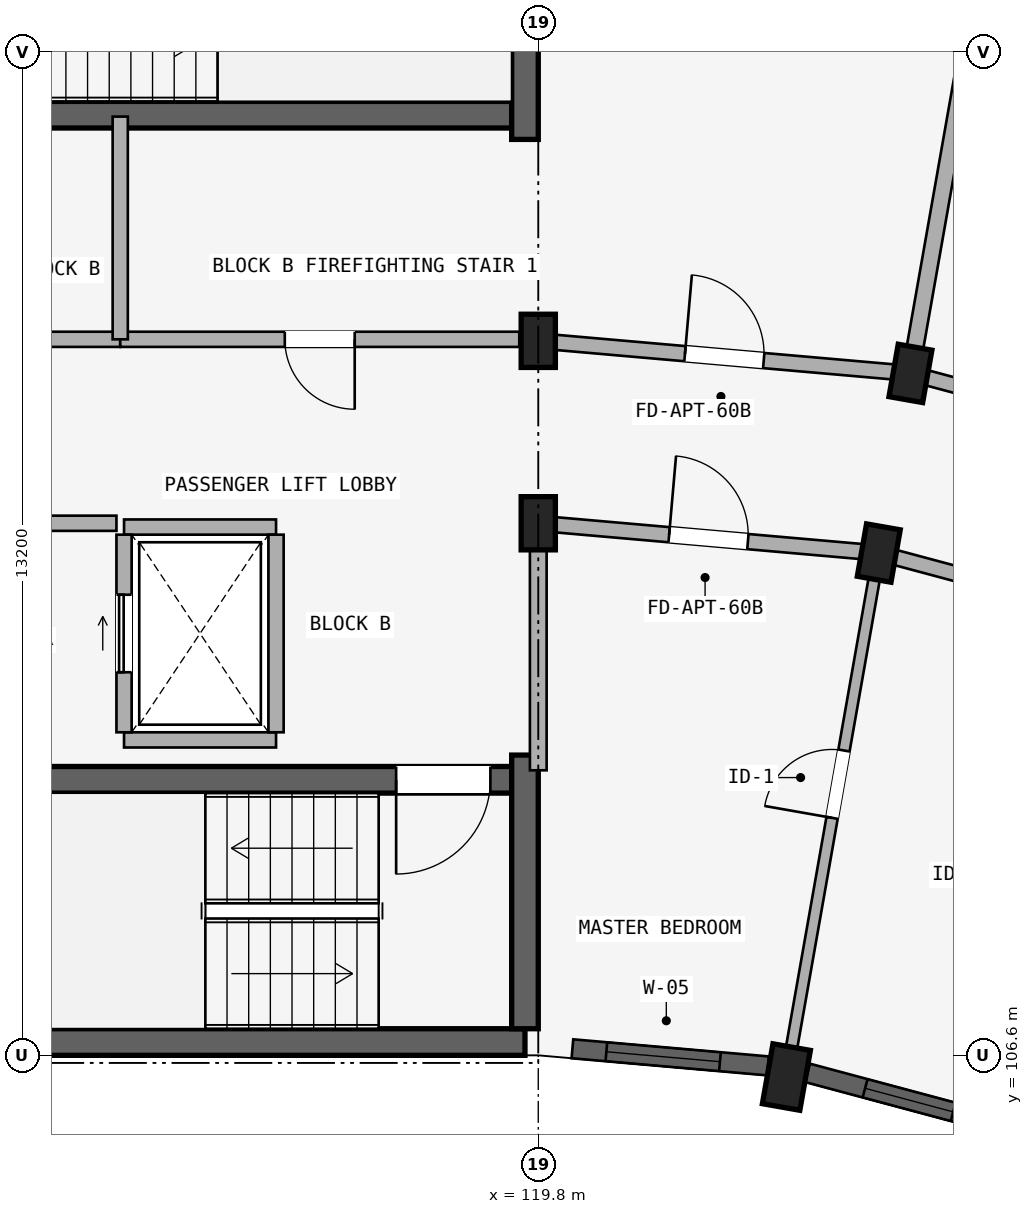
"""IFC4 building model, lengths in metres.
Left out: names, types, materials, properties, quantities, classifications, styles, units other than length and angle.
Written with IfcOpenShell. Run it as: python <this file> out.ifc"""

import sys

from ifc_helpers import new_model, si_unit, direction, frame, frame_2d, origin, origin_2d, place, context, subcontext, project, spatial, rectangle, extrude, element, fill, save


model = new_model("IFC4")
c1 = context("Model", 3, precision=1e-05, world=origin(), true_north=direction((0.0, 1.0)))
c2 = subcontext(c1, "Body", "Model", "MODEL_VIEW")
j1 = project(units=[si_unit("LENGTHUNIT", "METRE"), si_unit("PLANEANGLEUNIT", "RADIAN")], contexts=[c1])
p1 = place(None, origin())
s1 = spatial("IfcSite", under=j1, at=p1, CompositionType="ELEMENT")
p2 = place(p1, origin())
s2 = spatial("IfcBuilding", under=s1, at=p2, CompositionType="ELEMENT")
p3 = place(p2, frame((0.0, 0.0, 24.45)))
s3 = spatial("IfcBuildingStorey", under=s2, at=p3, CompositionType="ELEMENT", Elevation=24.45)
p4 = place(p3, frame((119.45, 118.975, 0.0), z_axis=(0.0, 0.0, 1.0), x_axis=(-1.0, 0.0, 0.0)))
e1 = element("IfcWall", 1, at=p4, inside=s3, PredefinedType="SHEAR", context=c2, shape_type="SweptSolid", body=[
    extrude(rectangle(XDim=8.075, YDim=0.35, at=frame_2d((4.038, 0.0))), origin(), (0.0, 0.0, 1.0), 2.93),
])
p5 = place(p4, frame((6.38, 0.0, 0.0)))
e2 = element("IfcOpeningElement", 2, at=p5, cuts=e1, PredefinedType="OPENING", context=c2, shape_type="SweptSolid", body=[
    extrude(rectangle(XDim=1.24, YDim=2.15, at=frame_2d((0.62, 1.075))), frame((0.0, 0.185, 0.0), z_axis=(0.0, -1.0, 0.0), x_axis=(1.0, 0.0, 0.0)), (0.0, 0.0, 1.0), 0.37),
])
p6 = place(p3, frame((119.625, 118.65, 0.0), z_axis=(0.0, 0.0, 1.0), x_axis=(0.0, 1.0, 0.0)))
e3 = element("IfcWall", 3, at=p6, inside=s3, PredefinedType="SHEAR", context=c2, shape_type="SweptSolid", body=[
    extrude(rectangle(XDim=3.6, YDim=0.35, at=frame_2d((1.8, 0.0))), origin(), (0.0, 0.0, 1.0), 2.93),
])
p7 = place(p3, frame((119.625, 106.775, 0.0), z_axis=(0.0, 0.0, 1.0), x_axis=(-1.0, 0.0, 0.0)))
e4 = element("IfcWall", 4, at=p7, inside=s3, PredefinedType="SHEAR", context=c2, shape_type="SweptSolid", body=[
    extrude(rectangle(XDim=8.25, YDim=0.35, at=frame_2d((4.125, 0.0))), origin(), (0.0, 0.0, 1.0), 2.93),
])
p8 = place(p3, frame((119.45, 110.225, 0.0), z_axis=(0.0, 0.0, 1.0), x_axis=(-1.0, 0.0, 0.0)))
e5 = element("IfcWall", 5, at=p8, inside=s3, PredefinedType="SHEAR", context=c2, shape_type="SweptSolid", body=[
    extrude(rectangle(XDim=7.9, YDim=0.35, at=frame_2d((3.95, 0.0))), origin(), (0.0, 0.0, 1.0), 2.93),
])
p9 = place(p8, frame((0.28, 0.0, 0.0)))
e6 = element("IfcOpeningElement", 6, at=p9, cuts=e5, PredefinedType="OPENING", context=c2, shape_type="SweptSolid", body=[
    extrude(rectangle(XDim=1.24, YDim=2.15, at=frame_2d((0.62, 1.075))), frame((0.0, 0.185, 0.0), z_axis=(0.0, -1.0, 0.0), x_axis=(1.0, 0.0, 0.0)), (0.0, 0.0, 1.0), 0.37),
])
p10 = place(p3, frame((119.625, 106.95, 0.0), z_axis=(0.0, 0.0, 1.0), x_axis=(0.0, 1.0, 0.0)))
e7 = element("IfcWall", 7, at=p10, inside=s3, PredefinedType="SHEAR", context=c2, shape_type="SweptSolid", body=[
    extrude(rectangle(XDim=3.6, YDim=0.35, at=frame_2d((1.8, 0.0))), origin(), (0.0, 0.0, 1.0), 2.93),
])
for number, where, z_axis, x_axis in (
    (8, (119.8, 113.6, 0.0), (0.0, 0.0, 1.0), (1.0, 0.0, 0.0)),
    (9, (119.8, 116.0, 0.0), (0.0, 0.0, 1.0), (1.0, 0.0, 0.0)),
):
    element("IfcColumn", number, at=place(p3, frame(where, z_axis=z_axis, x_axis=x_axis)), inside=s3, PredefinedType="COLUMN", context=c2, shape_type="SweptSolid", body=[
        extrude(rectangle(XDim=0.45, YDim=0.7, at=origin_2d()), origin(), (0.0, 0.0, 1.0), 2.93),
    ])
p11 = place(p3, frame((123.065, 106.314, 0.0), z_axis=(0.0, 0.0, 1.0), x_axis=(-0.984807753012, 0.173648177667, 0.0)))
e10 = element("IfcColumn", 10, at=p11, inside=s3, PredefinedType="COLUMN", context=c2, shape_type="SweptSolid", body=[
    extrude(rectangle(XDim=0.5, YDim=0.8, at=origin_2d()), origin(), (0.0, 0.0, 1.0), 2.93),
])
for number, where, z_axis, x_axis in (
    (11, (124.28, 113.208, 0.0), (0.0, 0.0, 1.0), (-0.985, 0.174, 0.0)),
    (12, (124.697, 115.572, 0.0), (0.0, 0.0, 1.0), (-0.985, 0.174, 0.0)),
):
    element("IfcColumn", number, at=place(p3, frame(where, z_axis=z_axis, x_axis=x_axis)), inside=s3, PredefinedType="COLUMN", context=c2, shape_type="SweptSolid", body=[
        extrude(rectangle(XDim=0.45, YDim=0.7, at=origin_2d()), origin(), (0.0, 0.0, 1.0), 2.93),
    ])
p12 = place(p3, frame((114.3, 116.02, 0.0), z_axis=(0.0, 0.0, 1.0), x_axis=(-1.0, 0.0, 0.0)))
e13 = element("IfcWall", 13, at=p12, inside=s3, PredefinedType="STANDARD", context=c2, shape_type="SweptSolid", body=[
    extrude(rectangle(XDim=5.65, YDim=0.2, at=frame_2d((2.825, 0.0))), origin(), (0.0, 0.0, 1.0), 2.372),
])
p13 = place(p12, frame((1.923, 0.0, 0.0)))
e14 = element("IfcOpeningElement", 14, at=p13, cuts=e13, PredefinedType="OPENING", context=c2, shape_type="SweptSolid", body=[
    extrude(rectangle(XDim=1.24, YDim=2.15, at=frame_2d((0.62, 1.075))), frame((0.0, 0.11, 0.0), z_axis=(0.0, -1.0, 0.0), x_axis=(1.0, 0.0, 0.0)), (0.0, 0.0, 1.0), 0.22),
])
p14 = place(p3, frame((119.55, 116.02, 0.0), z_axis=(0.0, 0.0, 1.0), x_axis=(-1.0, 0.0, 0.0)))
e15 = element("IfcWall", 15, at=p14, inside=s3, PredefinedType="STANDARD", context=c2, shape_type="SweptSolid", body=[
    extrude(rectangle(XDim=5.25, YDim=0.2, at=frame_2d((2.625, 0.0))), origin(), (0.0, 0.0, 1.0), 2.372),
])
p15 = place(p14, frame((2.165, 0.0, 0.0)))
e16 = element("IfcOpeningElement", 16, at=p15, cuts=e15, PredefinedType="OPENING", context=c2, shape_type="SweptSolid", body=[
    extrude(rectangle(XDim=0.92, YDim=2.1, at=frame_2d((0.46, 1.05))), frame((0.0, 0.11, 0.0), z_axis=(0.0, -1.0, 0.0), x_axis=(1.0, 0.0, 0.0)), (0.0, 0.0, 1.0), 0.22),
])
p16 = place(p3, frame((114.3, 116.02, 0.0), z_axis=(0.0, 0.0, 1.0), x_axis=(0.0, 1.0, 0.0)))
e17 = element("IfcWall", 17, at=p16, inside=s3, PredefinedType="STANDARD", context=c2, shape_type="SweptSolid", body=[
    extrude(rectangle(XDim=2.93, YDim=0.2, at=frame_2d((1.465, 0.0))), origin(), (0.0, 0.0, 1.0), 2.372),
])
p17 = place(p3, frame((116.35, 110.75, 0.0), z_axis=(0.0, 0.0, 1.0), x_axis=(-1.0, 0.0, 0.0)))
e18 = element("IfcWall", 18, at=p17, inside=s3, PredefinedType="STANDARD", context=c2, shape_type="SweptSolid", body=[
    extrude(rectangle(XDim=2.0, YDim=0.2, at=frame_2d((1.0, 0.0))), origin(), (0.0, 0.0, 1.0), 2.93),
])
p18 = place(p3, frame((116.35, 113.55, 0.0), z_axis=(0.0, 0.0, 1.0), x_axis=(-1.0, 0.0, 0.0)))
e19 = element("IfcWall", 19, at=p18, inside=s3, PredefinedType="STANDARD", context=c2, shape_type="SweptSolid", body=[
    extrude(rectangle(XDim=2.0, YDim=0.2, at=frame_2d((1.0, 0.0))), origin(), (0.0, 0.0, 1.0), 2.372),
])
p19 = place(p3, frame((116.35, 110.85, 0.0), z_axis=(0.0, 0.0, 1.0), x_axis=(0.0, 1.0, 0.0)))
e20 = element("IfcWall", 20, at=p19, inside=s3, PredefinedType="STANDARD", context=c2, shape_type="SweptSolid", body=[
    extrude(rectangle(XDim=2.6, YDim=0.2, at=frame_2d((1.3, 0.0))), origin(), (0.0, 0.0, 1.0), 2.372),
])
p20 = place(p3, frame((114.35, 110.85, 0.0), z_axis=(0.0, 0.0, 1.0), x_axis=(0.0, 1.0, 0.0)))
e21 = element("IfcWall", 21, at=p20, inside=s3, PredefinedType="STANDARD", context=c2, shape_type="SweptSolid", body=[
    extrude(rectangle(XDim=2.6, YDim=0.2, at=frame_2d((1.3, 0.0))), origin(), (0.0, 0.0, 1.0), 2.372),
])
p21 = place(p20, frame((0.79, 0.0, 0.0)))
e22 = element("IfcOpeningElement", 22, at=p21, cuts=e21, PredefinedType="OPENING", context=c2, shape_type="SweptSolid", body=[
    extrude(rectangle(XDim=1.02, YDim=2.15, at=frame_2d((0.51, 1.075))), frame((0.0, 0.11, 0.0), z_axis=(0.0, -1.0, 0.0), x_axis=(1.0, 0.0, 0.0)), (0.0, 0.0, 1.0), 0.22),
])
p22 = place(p3, frame((114.25, 113.6, 0.0), z_axis=(0.0, 0.0, 1.0), x_axis=(-1.0, 0.0, 0.0)))
e23 = element("IfcWall", 23, at=p22, inside=s3, PredefinedType="STANDARD", context=c2, shape_type="SweptSolid", body=[
    extrude(rectangle(XDim=5.6, YDim=0.2, at=frame_2d((2.8, 0.0))), origin(), (0.0, 0.0, 1.0), 2.372),
])
p23 = place(p22, frame((1.91, 0.0, 0.0)))
e24 = element("IfcOpeningElement", 24, at=p23, cuts=e23, PredefinedType="OPENING", context=c2, shape_type="SweptSolid", body=[
    extrude(rectangle(XDim=1.22, YDim=2.15, at=frame_2d((0.61, 1.075))), frame((0.0, 0.11, 0.0), z_axis=(0.0, -1.0, 0.0), x_axis=(1.0, 0.0, 0.0)), (0.0, 0.0, 1.0), 0.22),
])
p24 = place(p3, frame((119.8, 113.6, 0.0), z_axis=(0.0, 0.0, 1.0), x_axis=(0.996191949488, -0.087187153726, 0.0)))
e25 = element("IfcWall", 25, at=p24, inside=s3, PredefinedType="STANDARD", context=c2, shape_type="SweptSolid", body=[
    extrude(rectangle(XDim=4.497, YDim=0.2, at=frame_2d((2.249, 0.0))), origin(), (0.0, 0.0, 1.0), 2.372),
])
p25 = place(p24, frame((1.729, 0.0, 0.0)))
e26 = element("IfcOpeningElement", 26, at=p25, cuts=e25, PredefinedType="OPENING", context=c2, shape_type="SweptSolid", body=[
    extrude(rectangle(XDim=1.04, YDim=2.15, at=frame_2d((0.52, 1.075))), frame((0.0, 0.11, 0.0), z_axis=(0.0, -1.0, 0.0), x_axis=(1.0, 0.0, 0.0)), (0.0, 0.0, 1.0), 0.22),
])
p26 = place(p3, frame((119.8, 116.0, 0.0), z_axis=(0.0, 0.0, 1.0), x_axis=(0.996193663584, -0.087167566415, 0.0)))
e27 = element("IfcWall", 27, at=p26, inside=s3, PredefinedType="STANDARD", context=c2, shape_type="SweptSolid", body=[
    extrude(rectangle(XDim=4.916, YDim=0.2, at=frame_2d((2.458, 0.0))), origin(), (0.0, 0.0, 1.0), 2.372),
])
p27 = place(p26, frame((1.938, 0.0, 0.0)))
e28 = element("IfcOpeningElement", 28, at=p27, cuts=e27, PredefinedType="OPENING", context=c2, shape_type="SweptSolid", body=[
    extrude(rectangle(XDim=1.04, YDim=2.15, at=frame_2d((0.52, 1.075))), frame((0.0, 0.11, 0.0), z_axis=(0.0, -1.0, 0.0), x_axis=(1.0, 0.0, 0.0)), (0.0, 0.0, 1.0), 0.22),
])
p28 = place(p3, frame((124.28, 113.208, 0.0), z_axis=(0.0, 0.0, 1.0), x_axis=(0.965934240054, -0.258787642463, 0.0)))
e29 = element("IfcWall", 29, at=p28, inside=s3, PredefinedType="STANDARD", context=c2, shape_type="SweptSolid", body=[
    extrude(rectangle(XDim=4.497, YDim=0.2, at=frame_2d((2.249, 0.0))), origin(), (0.0, 0.0, 1.0), 2.372),
])
p29 = place(p3, frame((124.697, 115.572, 0.0), z_axis=(0.0, 0.0, 1.0), x_axis=(0.965930095386, -0.258803112091, 0.0)))
e30 = element("IfcWall", 30, at=p29, inside=s3, PredefinedType="STANDARD", context=c2, shape_type="SweptSolid", body=[
    extrude(rectangle(XDim=4.916, YDim=0.2, at=frame_2d((2.458, 0.0))), origin(), (0.0, 0.0, 1.0), 2.372),
])
p30 = place(p29, frame((1.918, 0.0, 0.0)))
e31 = element("IfcOpeningElement", 31, at=p30, cuts=e30, PredefinedType="OPENING", context=c2, shape_type="SweptSolid", body=[
    extrude(rectangle(XDim=1.08, YDim=2.15, at=frame_2d((0.54, 1.075))), frame((0.0, 0.11, 0.0), z_axis=(0.0, -1.0, 0.0), x_axis=(1.0, 0.0, 0.0)), (0.0, 0.0, 1.0), 0.22),
])
p31 = place(p3, frame((119.8, 110.35, 0.0), z_axis=(0.0, 0.0, 1.0), x_axis=(0.0, 1.0, 0.0)))
e32 = element("IfcWall", 32, at=p31, inside=s3, PredefinedType="STANDARD", context=c2, shape_type="SweptSolid", body=[
    extrude(rectangle(XDim=3.2, YDim=0.22, at=frame_2d((1.6, 0.0))), origin(), (0.0, 0.0, 1.0), 2.372),
])
p32 = place(p3, frame((123.099, 106.511, 0.0), z_axis=(0.0, 0.0, 1.0), x_axis=(0.173647089161, 0.984807944945, 0.0)))
e33 = element("IfcWall", 33, at=p32, inside=s3, PredefinedType="PARTITIONING", context=c2, shape_type="SweptSolid", body=[
    extrude(rectangle(XDim=6.75, YDim=0.15, at=frame_2d((3.375, 0.0))), origin(), (0.0, 0.0, 1.0), 2.372),
])
p33 = place(p32, frame((3.262, 0.0, 0.0)))
e34 = element("IfcOpeningElement", 34, at=p33, cuts=e33, PredefinedType="OPENING", context=c2, shape_type="SweptSolid", body=[
    extrude(rectangle(XDim=0.9, YDim=2.1, at=frame_2d((0.45, 1.05))), frame((0.0, 0.085, 0.0), z_axis=(0.0, -1.0, 0.0), x_axis=(1.0, 0.0, 0.0)), (0.0, 0.0, 1.0), 0.17),
])
p34 = place(p3, frame((124.714, 115.67, 0.0), z_axis=(0.0, 0.0, 1.0), x_axis=(0.173646216546, 0.984808098809, 0.0)))
e35 = element("IfcWall", 35, at=p34, inside=s3, PredefinedType="STANDARD", context=c2, shape_type="SweptSolid", body=[
    extrude(rectangle(XDim=17.42, YDim=0.22, at=frame_2d((8.71, 0.0))), origin(), (0.0, 0.0, 1.0), 2.372),
])
p35 = place(p3, frame((120.249, 106.686, 0.0), z_axis=(0.0, 0.0, 1.0), x_axis=(0.996188278786, -0.087229084652, 0.0)))
e36 = element("IfcWall", 36, at=p35, inside=s3, PredefinedType="STANDARD", context=c2, shape_type="SweptSolid", body=[
    extrude(rectangle(XDim=2.583, YDim=0.25, at=frame_2d((1.292, 0.0))), origin(), (0.0, 0.0, 1.0), 2.422),
])
p36 = place(p35, frame((0.448, 0.0, 0.572)))
e37 = element("IfcOpeningElement", 37, at=p36, cuts=e36, PredefinedType="OPENING", context=c2, shape_type="SweptSolid", body=[
    extrude(rectangle(XDim=1.5, YDim=1.65, at=frame_2d((0.75, 0.825))), frame((0.0, 0.135, 0.0), z_axis=(0.0, -1.0, 0.0), x_axis=(1.0, 0.0, 0.0)), (0.0, 0.0, 1.0), 0.27),
])
p37 = place(p3, frame((123.342, 106.369, 0.0), z_axis=(0.0, 0.0, 1.0), x_axis=(0.965935855992, -0.25878161084, 0.0)))
e38 = element("IfcWall", 38, at=p37, inside=s3, PredefinedType="STANDARD", context=c2, shape_type="SweptSolid", body=[
    extrude(rectangle(XDim=2.77, YDim=0.25, at=frame_2d((1.385, 0.0))), origin(), (0.0, 0.0, 1.0), 2.422),
])
p38 = place(p37, frame((0.785, 0.0, 0.722)))
e39 = element("IfcOpeningElement", 39, at=p38, cuts=e38, PredefinedType="OPENING", context=c2, shape_type="SweptSolid", body=[
    extrude(rectangle(XDim=1.2, YDim=1.5, at=frame_2d((0.6, 0.75))), frame((0.0, 0.135, 0.0), z_axis=(0.0, -1.0, 0.0), x_axis=(1.0, 0.0, 0.0)), (0.0, 0.0, 1.0), 0.27),
])
p39 = place(p36, origin())
e40 = element("IfcWindow", 40, at=p39, inside=s3, PartitioningType="DOUBLE_PANEL_VERTICAL", PredefinedType="WINDOW", context=c2, shape_type="SweptSolid", body=[
    extrude(rectangle(XDim=1.5, YDim=1.65, at=frame_2d((0.75, 0.825))), frame((0.0, 0.03, 0.0), z_axis=(0.0, -1.0, 0.0), x_axis=(1.0, 0.0, 0.0)), (0.0, 0.0, 1.0), 0.06),
])
fill(e37, e40)
p40 = place(p38, origin())
e41 = element("IfcWindow", 41, at=p40, inside=s3, PartitioningType="SINGLE_PANEL", PredefinedType="WINDOW", context=c2, shape_type="SweptSolid", body=[
    extrude(rectangle(XDim=1.2, YDim=1.5, at=frame_2d((0.6, 0.75))), frame((0.0, 0.03, 0.0), z_axis=(0.0, -1.0, 0.0), x_axis=(1.0, 0.0, 0.0)), (0.0, 0.0, 1.0), 0.06),
])
fill(e39, e41)
p41 = place(p15, origin())
e42 = element("IfcDoor", 42, at=p41, inside=s3, OperationType="SINGLE_SWING_LEFT", PredefinedType="DOOR", context=c2, shape_type="SweptSolid", body=[
    extrude(rectangle(XDim=0.92, YDim=2.1, at=frame_2d((0.46, 1.05))), frame((0.0, 0.025, 0.0), z_axis=(0.0, -1.0, 0.0), x_axis=(1.0, 0.0, 0.0)), (0.0, 0.0, 1.0), 0.05),
])
fill(e16, e42)
p42 = place(p9, origin())
e43 = element("IfcDoor", 43, at=p42, inside=s3, OperationType="SINGLE_SWING_RIGHT", PredefinedType="DOOR", context=c2, shape_type="SweptSolid", body=[
    extrude(rectangle(XDim=1.24, YDim=2.15, at=frame_2d((0.62, 1.075))), frame((0.0, 0.025, 0.0), z_axis=(0.0, -1.0, 0.0), x_axis=(1.0, 0.0, 0.0)), (0.0, 0.0, 1.0), 0.05),
])
fill(e6, e43)
p43 = place(p21, origin())
e44 = element("IfcDoor", 44, at=p43, inside=s3, OperationType="SLIDING_TO_RIGHT", PredefinedType="DOOR", context=c2, shape_type="SweptSolid", body=[
    extrude(rectangle(XDim=1.02, YDim=2.15, at=frame_2d((0.51, 1.075))), frame((0.0, 0.025, 0.0), z_axis=(0.0, -1.0, 0.0), x_axis=(1.0, 0.0, 0.0)), (0.0, 0.0, 1.0), 0.05),
])
fill(e22, e44)
p44 = place(p33, frame((0.9, 0.0, 0.0), z_axis=(0.0, 0.0, 1.0), x_axis=(-1.0, 0.0, 0.0)))
e45 = element("IfcDoor", 45, at=p44, inside=s3, OperationType="SINGLE_SWING_RIGHT", PredefinedType="DOOR", context=c2, shape_type="SweptSolid", body=[
    extrude(rectangle(XDim=0.9, YDim=2.1, at=frame_2d((0.45, 1.05))), frame((0.0, 0.025, 0.0), z_axis=(0.0, -1.0, 0.0), x_axis=(1.0, 0.0, 0.0)), (0.0, 0.0, 1.0), 0.05),
])
fill(e34, e45)
p45 = place(p27, origin())
e46 = element("IfcDoor", 46, at=p45, inside=s3, OperationType="SINGLE_SWING_LEFT", PredefinedType="DOOR", context=c2, shape_type="SweptSolid", body=[
    extrude(rectangle(XDim=1.04, YDim=2.15, at=frame_2d((0.52, 1.075))), frame((0.0, 0.025, 0.0), z_axis=(0.0, -1.0, 0.0), x_axis=(1.0, 0.0, 0.0)), (0.0, 0.0, 1.0), 0.05),
])
fill(e28, e46)
p46 = place(p25, origin())
e47 = element("IfcDoor", 47, at=p46, inside=s3, OperationType="SINGLE_SWING_LEFT", PredefinedType="DOOR", context=c2, shape_type="SweptSolid", body=[
    extrude(rectangle(XDim=1.04, YDim=2.15, at=frame_2d((0.52, 1.075))), frame((0.0, 0.025, 0.0), z_axis=(0.0, -1.0, 0.0), x_axis=(1.0, 0.0, 0.0)), (0.0, 0.0, 1.0), 0.05),
])
fill(e26, e47)
save(model, sys.argv[1])
